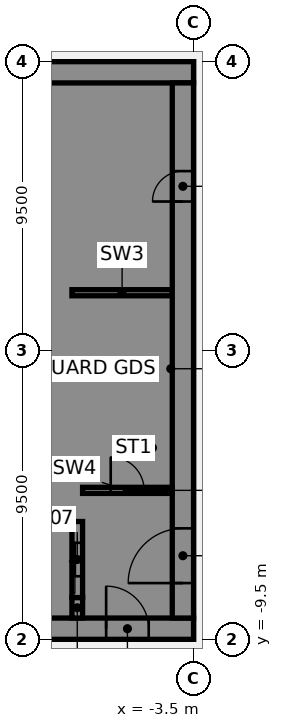
"""IFC4 building model, lengths in metres.
Left out: names, types, materials, properties, quantities, classifications, styles, units other than length and angle.
Written with IfcOpenShell. Run it as: python <this file> out.ifc"""

import sys

from ifc_helpers import new_model, si_unit, direction, frame, frame_2d, origin, place, context, subcontext, project, spatial, polyline, rectangle, outline, extrude, element, fill, save


model = new_model("IFC4")
c1 = context("Model", 3, precision=1e-05, world=origin(), true_north=direction((0.0, 1.0)))
c2 = subcontext(c1, "Body", "Model", "MODEL_VIEW")
j1 = project(units=[si_unit("LENGTHUNIT", "METRE"), si_unit("PLANEANGLEUNIT", "RADIAN")], contexts=[c1])
p1 = place(None, origin())
s1 = spatial("IfcSite", under=j1, at=p1, CompositionType="ELEMENT")
p2 = place(p1, origin())
s2 = spatial("IfcBuilding", under=s1, at=p2, CompositionType="ELEMENT")
p3 = place(p2, frame((0.0, 0.0, 37.75)))
s3 = spatial("IfcBuildingStorey", under=s2, at=p3, CompositionType="ELEMENT", Elevation=37.75)
p4 = place(p3, frame((-16.5, -9.15, 0.0), z_axis=(0.0, 0.0, 1.0), x_axis=(1.0, 0.0, 0.0)))
e1 = element("IfcWall", 1, at=p4, inside=s3, PredefinedType="SHEAR", context=c2, shape_type="SweptSolid", body=[
    extrude(rectangle(XDim=13.0, YDim=0.7, at=frame_2d((6.5, 0.0))), origin(), (0.0, 0.0, 1.0), 3.61),
])
p5 = place(p4, frame((4.15, 0.0, 0.0)))
e2 = element("IfcOpeningElement", 2, at=p5, cuts=e1, PredefinedType="OPENING", context=c2, shape_type="SweptSolid", body=[
    extrude(rectangle(XDim=1.4, YDim=2.1, at=frame_2d((0.7, 1.05))), frame((0.0, 0.36, 0.0), z_axis=(0.0, -1.0, 0.0), x_axis=(1.0, 0.0, 0.0)), (0.0, 0.0, 1.0), 0.72),
])
p6 = place(p4, frame((10.125, 0.0, 0.0)))
e3 = element("IfcOpeningElement", 3, at=p6, cuts=e1, PredefinedType="OPENING", context=c2, shape_type="SweptSolid", body=[
    extrude(rectangle(XDim=1.4, YDim=2.1, at=frame_2d((0.7, 1.05))), frame((0.0, 0.36, 0.0), z_axis=(0.0, -1.0, 0.0), x_axis=(1.0, 0.0, 0.0)), (0.0, 0.0, 1.0), 0.72),
])
p7 = place(p3, frame((-16.5, 9.15, 0.0), z_axis=(0.0, 0.0, 1.0), x_axis=(1.0, 0.0, 0.0)))
e4 = element("IfcWall", 4, at=p7, inside=s3, PredefinedType="SHEAR", context=c2, shape_type="SweptSolid", body=[
    extrude(rectangle(XDim=13.0, YDim=0.7, at=frame_2d((6.5, 0.0))), origin(), (0.0, 0.0, 1.0), 3.61),
])
p8 = place(p3, origin())
e5 = element("IfcWall", 5, at=p8, inside=s3, PredefinedType="SHEAR", context=c2, shape_type="SweptSolid", body=[
    extrude(outline(polyline([(-9.8, -5.375), (-9.8, -5.625), (-7.5, -5.625), (-7.15, -5.625), (-7.15, 8.8), (-7.5, 8.8), (-9.8, 8.8), (-9.8, 8.125), (-7.5, 8.125), (-7.5, 5.625), (-9.8, 5.625), (-9.8, 5.375), (-7.5, 5.375), (-7.5, 2.875), (-9.8, 2.875), (-9.8, 2.625), (-7.5, 2.625), (-7.5, 0.125), (-9.8, 0.125), (-9.8, -0.125), (-7.5, -0.125), (-7.5, -2.625), (-9.8, -2.625), (-9.8, -2.875), (-7.5, -2.875), (-7.5, -5.375), (-9.8, -5.375)])), origin(), (0.0, 0.0, 1.0), 3.61),
])
p9 = place(p3, origin())
e6 = element("IfcWall", 6, at=p9, inside=s3, PredefinedType="SHEAR", context=c2, shape_type="SweptSolid", body=[
    extrude(outline(polyline([(-7.5, -8.125), (-9.55, -8.125), (-9.55, -5.625), (-9.8, -5.625), (-9.8, -8.125), (-9.8, -8.8), (-7.5, -8.8), (-7.5, -8.125)])), origin(), (0.0, 0.0, 1.0), 3.61),
])
p10 = place(p3, frame((-7.325, -8.8, 0.0), z_axis=(0.0, 0.0, 1.0), x_axis=(0.0, 1.0, 0.0)))
e7 = element("IfcWall", 7, at=p10, inside=s3, PredefinedType="SHEAR", context=c2, shape_type="SweptSolid", body=[
    extrude(rectangle(XDim=0.675, YDim=0.35, at=frame_2d((0.337, 0.0))), origin(), (0.0, 0.0, 1.0), 3.61),
])
p11 = place(p3, frame((-7.5, 1.9, 0.0), z_axis=(0.0, 0.0, 1.0), x_axis=(1.0, 0.0, 0.0)))
e8 = element("IfcWall", 8, at=p11, inside=s3, PredefinedType="SHEAR", context=c2, shape_type="SweptSolid", body=[
    extrude(rectangle(XDim=3.3, YDim=0.2, at=frame_2d((1.65, 0.0))), origin(), (0.0, 0.0, 1.0), 3.61),
])
p12 = place(p3, frame((-7.325, -8.125, 0.0), z_axis=(0.0, 0.0, 1.0), x_axis=(0.0, 1.0, 0.0)))
e9 = element("IfcWall", 9, at=p12, inside=s3, PredefinedType="SHEAR", context=c2, shape_type="SweptSolid", body=[
    extrude(rectangle(XDim=2.5, YDim=0.35, at=frame_2d((1.25, 0.0))), origin(), (0.0, 0.0, 1.0), 3.61),
])
p13 = place(p12, frame((0.7, 0.0, 0.0)))
e10 = element("IfcOpeningElement", 10, at=p13, cuts=e9, PredefinedType="OPENING", context=c2, shape_type="SweptSolid", body=[
    extrude(rectangle(XDim=1.1, YDim=2.1, at=frame_2d((0.55, 1.05))), frame((0.0, 0.185, 0.0), z_axis=(0.0, -1.0, 0.0), x_axis=(1.0, 0.0, 0.0)), (0.0, 0.0, 1.0), 0.37),
])
p14 = place(p3, frame((-3.85, -8.8, 0.0), z_axis=(0.0, 0.0, 1.0), x_axis=(0.0, 1.0, 0.0)))
e11 = element("IfcWall", 11, at=p14, inside=s3, PredefinedType="SHEAR", context=c2, shape_type="SweptSolid", body=[
    extrude(rectangle(XDim=17.6, YDim=0.7, at=frame_2d((8.8, 0.0))), origin(), (0.0, 0.0, 1.0), 3.61),
])
p15 = place(p14, frame((1.15, 0.0, 0.0)))
e12 = element("IfcOpeningElement", 12, at=p15, cuts=e11, PredefinedType="OPENING", context=c2, shape_type="SweptSolid", body=[
    extrude(rectangle(XDim=1.8, YDim=2.1, at=frame_2d((0.9, 1.05))), frame((0.0, 0.36, 0.0), z_axis=(0.0, -1.0, 0.0), x_axis=(1.0, 0.0, 0.0)), (0.0, 0.0, 1.0), 0.72),
])
p16 = place(p14, frame((13.7, 0.0, 0.0)))
e13 = element("IfcOpeningElement", 13, at=p16, cuts=e11, PredefinedType="OPENING", context=c2, shape_type="SweptSolid", body=[
    extrude(rectangle(XDim=1.0, YDim=2.1, at=frame_2d((0.5, 1.05))), frame((0.0, 0.36, 0.0), z_axis=(0.0, -1.0, 0.0), x_axis=(1.0, 0.0, 0.0)), (0.0, 0.0, 1.0), 0.72),
])
p17 = place(p3, frame((-7.15, -4.6, 0.0), z_axis=(0.0, 0.0, 1.0), x_axis=(1.0, 0.0, 0.0)))
e14 = element("IfcWall", 14, at=p17, inside=s3, PredefinedType="SHEAR", context=c2, shape_type="SweptSolid", body=[
    extrude(rectangle(XDim=2.95, YDim=0.2, at=frame_2d((1.475, 0.0))), origin(), (0.0, 0.0, 1.0), 3.61),
])
p18 = place(p17, frame((0.925, 0.0, 0.0)))
e15 = element("IfcOpeningElement", 15, at=p18, cuts=e14, PredefinedType="OPENING", context=c2, shape_type="SweptSolid", body=[
    extrude(rectangle(XDim=1.1, YDim=2.1, at=frame_2d((0.55, 1.05))), frame((0.0, 0.11, 0.0), z_axis=(0.0, -1.0, 0.0), x_axis=(1.0, 0.0, 0.0)), (0.0, 0.0, 1.0), 0.22),
])
p19 = place(p6, origin())
e16 = element("IfcDoor", 16, at=p19, inside=s3, OperationType="SINGLE_SWING_LEFT", PredefinedType="DOOR", context=c2, shape_type="SweptSolid", body=[
    extrude(rectangle(XDim=1.4, YDim=2.1, at=frame_2d((0.7, 1.05))), frame((0.0, 0.025, 0.0), z_axis=(0.0, -1.0, 0.0), x_axis=(1.0, 0.0, 0.0)), (0.0, 0.0, 1.0), 0.05),
])
fill(e3, e16)
p20 = place(p15, origin())
e17 = element("IfcDoor", 17, at=p20, inside=s3, OperationType="SINGLE_SWING_LEFT", PredefinedType="DOOR", context=c2, shape_type="SweptSolid", body=[
    extrude(rectangle(XDim=1.8, YDim=2.1, at=frame_2d((0.9, 1.05))), frame((0.0, 0.025, 0.0), z_axis=(0.0, -1.0, 0.0), x_axis=(1.0, 0.0, 0.0)), (0.0, 0.0, 1.0), 0.05),
])
fill(e12, e17)
p21 = place(p16, origin())
e18 = element("IfcDoor", 18, at=p21, inside=s3, OperationType="SINGLE_SWING_LEFT", PredefinedType="DOOR", context=c2, shape_type="SweptSolid", body=[
    extrude(rectangle(XDim=1.0, YDim=2.1, at=frame_2d((0.5, 1.05))), frame((0.0, 0.025, 0.0), z_axis=(0.0, -1.0, 0.0), x_axis=(1.0, 0.0, 0.0)), (0.0, 0.0, 1.0), 0.05),
])
fill(e13, e18)
p22 = place(p18, origin())
e19 = element("IfcDoor", 19, at=p22, inside=s3, OperationType="SINGLE_SWING_LEFT", PredefinedType="DOOR", context=c2, shape_type="SweptSolid", body=[
    extrude(rectangle(XDim=1.1, YDim=2.1, at=frame_2d((0.55, 1.05))), frame((0.0, 0.025, 0.0), z_axis=(0.0, -1.0, 0.0), x_axis=(1.0, 0.0, 0.0)), (0.0, 0.0, 1.0), 0.05),
])
fill(e15, e19)
p23 = place(p13, origin())
e20 = element("IfcDoor", 20, at=p23, inside=s3, OperationType="SLIDING_TO_LEFT", PredefinedType="DOOR", context=c2, shape_type="SweptSolid", body=[
    extrude(rectangle(XDim=1.1, YDim=2.1, at=frame_2d((0.55, 1.05))), frame((0.0, 0.025, 0.0), z_axis=(0.0, -1.0, 0.0), x_axis=(1.0, 0.0, 0.0)), (0.0, 0.0, 1.0), 0.05),
])
fill(e10, e20)
save(model, sys.argv[1])
